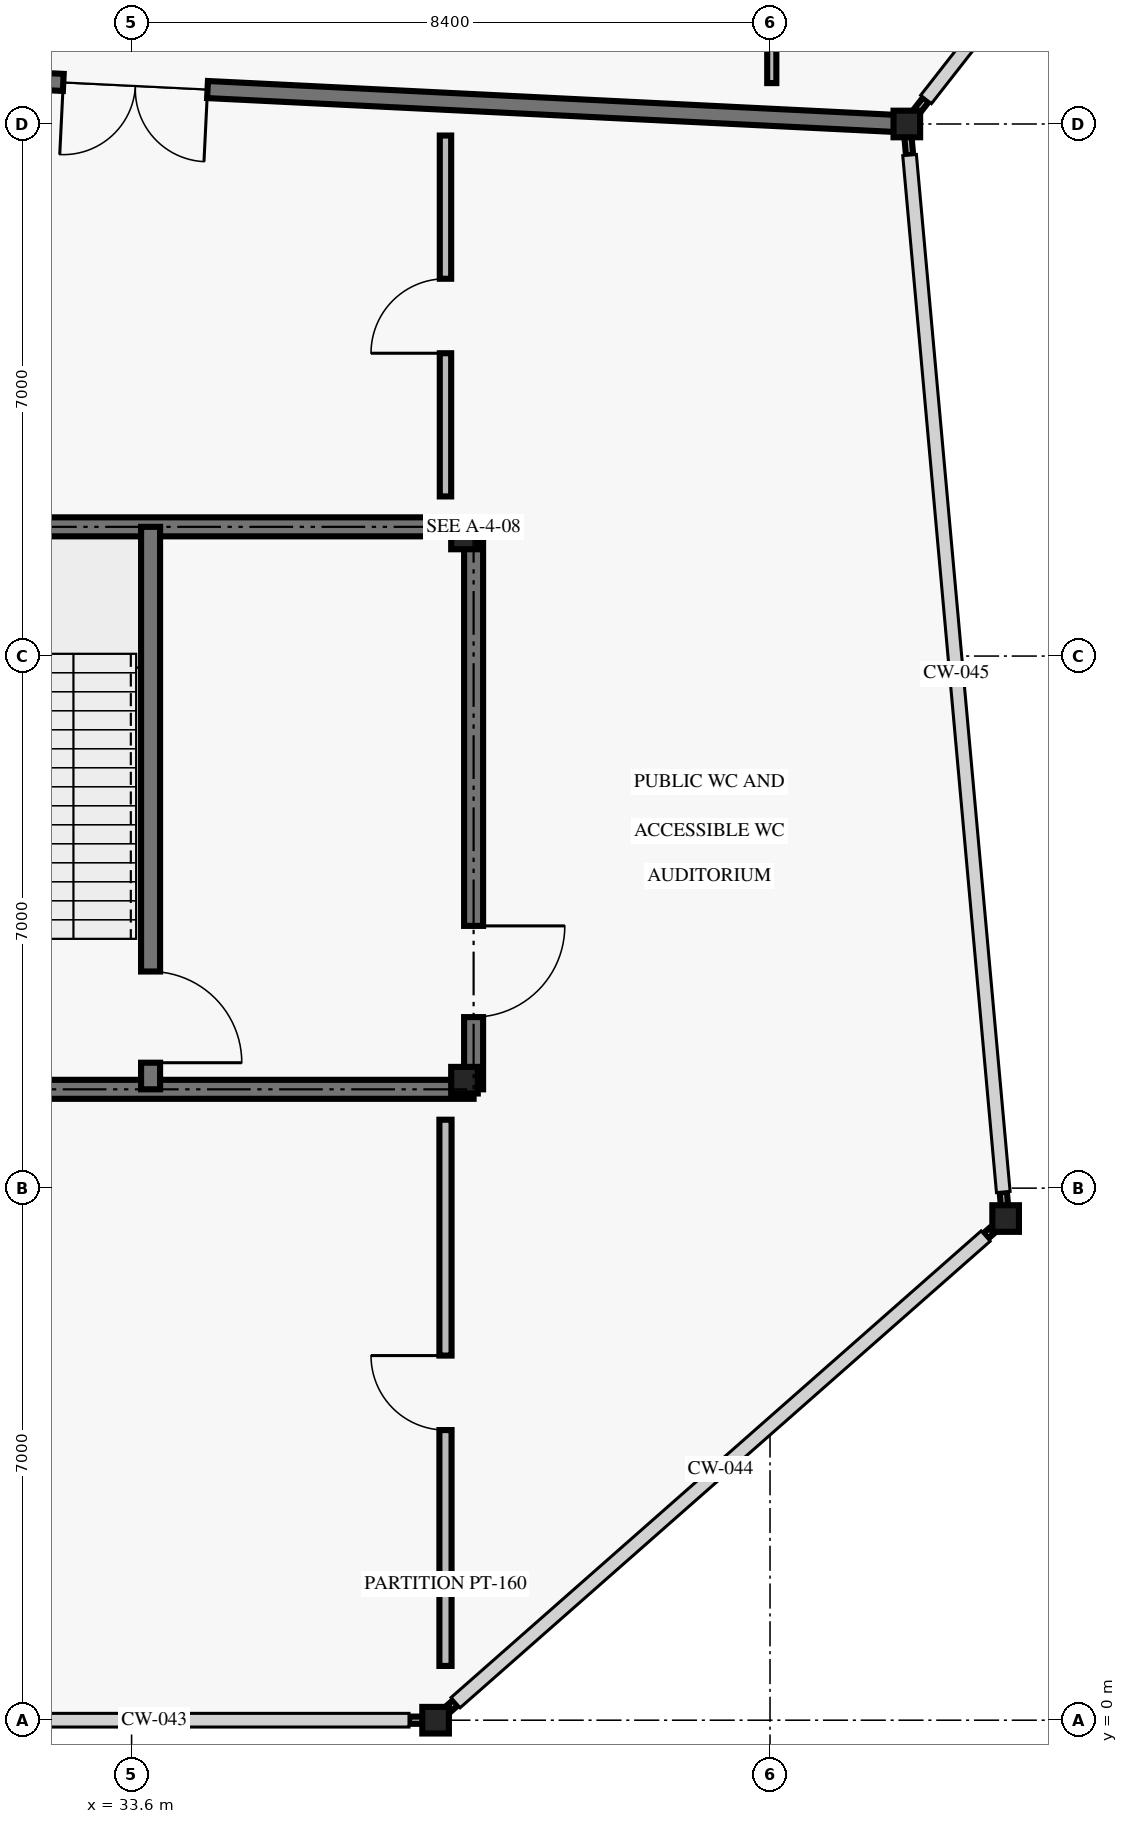
"""IFC4 building model, lengths in metres.
Left out: names, types, materials, properties, quantities, classifications, styles, units other than length and angle.
Written with IfcOpenShell. Run it as: python <this file> out.ifc"""

import sys

from ifc_helpers import new_model, si_unit, direction, frame, frame_2d, origin, origin_2d, place, context, subcontext, project, spatial, rectangle, i_section, extrude, element, fill, save


model = new_model("IFC4")
c1 = context("Model", 3, precision=1e-05, world=origin(), true_north=direction((0.0, 1.0)))
c2 = subcontext(c1, "Body", "Model", "MODEL_VIEW")
j1 = project(units=[si_unit("LENGTHUNIT", "METRE"), si_unit("PLANEANGLEUNIT", "RADIAN")], contexts=[c1])
p1 = place(None, origin())
s1 = spatial("IfcSite", under=j1, at=p1, CompositionType="ELEMENT")
p2 = place(p1, origin())
s2 = spatial("IfcBuilding", under=s1, at=p2, CompositionType="ELEMENT")
p3 = place(p2, origin())
s3 = spatial("IfcBuildingStorey", under=s2, at=p3, CompositionType="ELEMENT", Elevation=0.0)
for number, where, z_axis, x_axis in (
    (1, (37.6, 0.0, 0.0), (0.0, 0.0, 1.0), (1.0, 0.0, 0.0)),
    (2, (43.8, 21.0, 0.0), (0.0, 0.0, 1.0), (1.0, 0.0, 0.0)),
    (3, (45.1, 6.6, 0.0), (0.0, 0.0, 1.0), (1.0, 0.0, 0.0)),
    (4, (37.98, 8.42, 0.0), (0.0, 0.0, 1.0), (1.0, 0.0, 0.0)),
    (5, (37.98, 15.58, 0.0), (0.0, 0.0, 1.0), (1.0, 0.0, 0.0)),
):
    element("IfcColumn", number, at=place(p3, frame(where, z_axis=z_axis, x_axis=x_axis)), inside=s3, PredefinedType="COLUMN", context=c2, shape_type="SweptSolid", body=[
        extrude(i_section(OverallWidth=0.35, OverallDepth=0.35, WebThickness=0.02, FlangeThickness=0.028, at=origin_2d()), origin(), (0.0, 0.0, 1.0), 5.4),
    ])
p4 = place(p3, frame((37.558, 0.0, 0.0), z_axis=(0.0, 0.0, 1.0), x_axis=(-1.0, 0.0, 0.0)))
e6 = element("IfcWall", 6, at=p4, inside=s3, PredefinedType="SOLIDWALL", context=c2, shape_type="SweptSolid", body=[
    extrude(rectangle(XDim=0.308, YDim=0.095, at=frame_2d((0.154, 0.0))), origin(), (0.0, 0.0, 1.0), 4.22),
])
p5 = place(p3, frame((45.068, 6.572, 0.0), z_axis=(0.0, 0.0, 1.0), x_axis=(-0.75124833206, -0.660019653932, 0.0)))
e7 = element("IfcWall", 7, at=p5, inside=s3, PredefinedType="SOLIDWALL", context=c2, shape_type="SweptSolid", body=[
    extrude(rectangle(XDim=0.308, YDim=0.095, at=frame_2d((0.154, 0.0))), origin(), (0.0, 0.0, 1.0), 4.22),
])
p6 = place(p3, frame((37.863, 0.231, 0.0), z_axis=(0.0, 0.0, 1.0), x_axis=(-0.751296149946, -0.659965222627, 0.0)))
e8 = element("IfcWall", 8, at=p6, inside=s3, PredefinedType="SOLIDWALL", context=c2, shape_type="SweptSolid", body=[
    extrude(rectangle(XDim=0.307, YDim=0.095, at=frame_2d((0.154, 0.0))), origin(), (0.0, 0.0, 1.0), 4.22),
])
for number, where, z_axis, x_axis in (
    (9, (43.809, 20.898, 0.0), (0.0, 0.0, 1.0), (0.087, -0.996, 0.0)),
    (10, (45.069, 6.949, 0.0), (0.0, 0.0, 1.0), (0.087, -0.996, 0.0)),
):
    element("IfcWall", number, at=place(p3, frame(where, z_axis=z_axis, x_axis=x_axis)), inside=s3, PredefinedType="SOLIDWALL", context=c2, shape_type="SweptSolid", body=[
        extrude(rectangle(XDim=0.308, YDim=0.095, at=frame_2d((0.154, 0.0))), origin(), (0.0, 0.0, 1.0), 4.22),
    ])
p7 = place(p3, frame((44.053, 21.323, 0.0), z_axis=(0.0, 0.0, 1.0), x_axis=(-0.615966636313, -0.787772240529, 0.0)))
e11 = element("IfcWall", 11, at=p7, inside=s3, PredefinedType="SOLIDWALL", context=c2, shape_type="SweptSolid", body=[
    extrude(rectangle(XDim=0.308, YDim=0.095, at=frame_2d((0.154, 0.0))), origin(), (0.0, 0.0, 1.0), 4.22),
])
p8 = place(p3, frame((43.8, 21.0, 0.0), z_axis=(0.0, 0.0, 1.0), x_axis=(-0.998788882418, 0.049201304434, 0.0)))
e12 = element("IfcWall", 12, at=p8, inside=s3, PredefinedType="SOLIDWALL", context=c2, shape_type="SweptSolid", body=[
    extrude(rectangle(XDim=20.325, YDim=0.225, at=frame_2d((10.162, 0.0))), origin(), (0.0, 0.0, 1.0), 4.62),
])
p9 = place(p8, frame((9.212, 0.0, 0.0)))
e13 = element("IfcOpeningElement", 13, at=p9, cuts=e12, PredefinedType="OPENING", context=c2, shape_type="SweptSolid", body=[
    extrude(rectangle(XDim=1.9, YDim=2.35, at=frame_2d((0.95, 1.175))), frame((0.0, 0.123, 0.0), z_axis=(0.0, -1.0, 0.0), x_axis=(1.0, 0.0, 0.0)), (0.0, 0.0, 1.0), 0.245),
])
p10 = place(p3, frame((37.73, 0.714, 0.0), z_axis=(0.0, 0.0, 1.0), x_axis=(0.0, 1.0, 0.0)))
e14 = element("IfcWall", 14, at=p10, inside=s3, PredefinedType="PARTITIONING", context=c2, shape_type="SweptSolid", body=[
    extrude(rectangle(XDim=7.186, YDim=0.16, at=frame_2d((3.593, 0.0))), origin(), (0.0, 0.0, 1.0), 3.92),
])
p11 = place(p10, frame((3.103, 0.0, 0.0)))
e15 = element("IfcOpeningElement", 15, at=p11, cuts=e14, PredefinedType="OPENING", context=c2, shape_type="SweptSolid", body=[
    extrude(rectangle(XDim=0.98, YDim=2.15, at=frame_2d((0.49, 1.075))), frame((0.0, 0.09, 0.0), z_axis=(0.0, -1.0, 0.0), x_axis=(1.0, 0.0, 0.0)), (0.0, 0.0, 1.0), 0.18),
])
p12 = place(p3, frame((37.73, 16.1, 0.0), z_axis=(0.0, 0.0, 1.0), x_axis=(0.0, 1.0, 0.0)))
e16 = element("IfcWall", 16, at=p12, inside=s3, PredefinedType="PARTITIONING", context=c2, shape_type="SweptSolid", body=[
    extrude(rectangle(XDim=4.748, YDim=0.15, at=frame_2d((2.374, 0.0))), origin(), (0.0, 0.0, 1.0), 3.92),
])
p13 = place(p12, frame((1.884, 0.0, 0.0)))
e17 = element("IfcOpeningElement", 17, at=p13, cuts=e16, PredefinedType="OPENING", context=c2, shape_type="SweptSolid", body=[
    extrude(rectangle(XDim=0.98, YDim=2.15, at=frame_2d((0.49, 1.075))), frame((0.0, 0.085, 0.0), z_axis=(0.0, -1.0, 0.0), x_axis=(1.0, 0.0, 0.0)), (0.0, 0.0, 1.0), 0.17),
])
p14 = place(p3, frame((42.023, 21.538, 0.0), z_axis=(0.0, 0.0, 1.0), x_axis=(0.0, 1.0, 0.0)))
e18 = element("IfcWall", 18, at=p14, inside=s3, PredefinedType="PARTITIONING", context=c2, shape_type="SweptSolid", body=[
    extrude(rectangle(XDim=18.532, YDim=0.12, at=frame_2d((9.266, 0.0))), origin(), (0.0, 0.0, 1.0), 3.92),
])
p15 = place(p14, frame((8.776, 0.0, 0.0)))
e19 = element("IfcOpeningElement", 19, at=p15, cuts=e18, PredefinedType="OPENING", context=c2, shape_type="SweptSolid", body=[
    extrude(rectangle(XDim=0.98, YDim=2.15, at=frame_2d((0.49, 1.075))), frame((0.0, 0.07, 0.0), z_axis=(0.0, -1.0, 0.0), x_axis=(1.0, 0.0, 0.0)), (0.0, 0.0, 1.0), 0.14),
])
for number, where, z_axis, x_axis in (
    (20, (28.9, 15.7, 0.0), (0.0, 0.0, 1.0), (1.0, 0.0, 0.0)),
    (21, (38.1, 8.3, 0.0), (0.0, 0.0, 1.0), (-1.0, 0.0, 0.0)),
):
    element("IfcWall", number, at=place(p3, frame(where, z_axis=z_axis, x_axis=x_axis)), inside=s3, PredefinedType="SHEAR", context=c2, shape_type="SweptSolid", body=[
        extrude(rectangle(XDim=9.2, YDim=0.25, at=frame_2d((4.6, 0.0))), origin(), (0.0, 0.0, 1.0), 5.16),
    ])
p16 = place(p3, frame((38.1, 15.7, 0.0), z_axis=(0.0, 0.0, 1.0), x_axis=(0.0, -1.0, 0.0)))
e22 = element("IfcWall", 22, at=p16, inside=s3, PredefinedType="SHEAR", context=c2, shape_type="SweptSolid", body=[
    extrude(rectangle(XDim=7.4, YDim=0.25, at=frame_2d((3.7, 0.0))), origin(), (0.0, 0.0, 1.0), 5.16),
])
p17 = place(p16, frame((5.25, 0.0, 0.0)))
e23 = element("IfcOpeningElement", 23, at=p17, cuts=e22, PredefinedType="OPENING", context=c2, shape_type="SweptSolid", body=[
    extrude(rectangle(XDim=1.2, YDim=2.2, at=frame_2d((0.6, 1.1))), frame((0.0, 0.135, 0.0), z_axis=(0.0, -1.0, 0.0), x_axis=(1.0, 0.0, 0.0)), (0.0, 0.0, 1.0), 0.27),
])
p18 = place(p3, frame((33.85, 15.7, 0.0), z_axis=(0.0, 0.0, 1.0), x_axis=(0.0, -1.0, 0.0)))
e24 = element("IfcWall", 24, at=p18, inside=s3, PredefinedType="SHEAR", context=c2, shape_type="SweptSolid", body=[
    extrude(rectangle(XDim=7.4, YDim=0.25, at=frame_2d((3.7, 0.0))), origin(), (0.0, 0.0, 1.0), 5.16),
])
p19 = place(p18, frame((5.85, 0.0, 0.0)))
e25 = element("IfcOpeningElement", 25, at=p19, cuts=e24, PredefinedType="OPENING", context=c2, shape_type="SweptSolid", body=[
    extrude(rectangle(XDim=1.2, YDim=2.2, at=frame_2d((0.6, 1.1))), frame((0.0, 0.135, 0.0), z_axis=(0.0, -1.0, 0.0), x_axis=(1.0, 0.0, 0.0)), (0.0, 0.0, 1.0), 0.27),
])
p20 = place(p9, origin())
e26 = element("IfcDoor", 26, at=p20, inside=s3, OperationType="DOUBLE_DOOR_SINGLE_SWING", PredefinedType="DOOR", context=c2, shape_type="SweptSolid", body=[
    extrude(rectangle(XDim=1.9, YDim=2.35, at=frame_2d((0.95, 1.175))), frame((0.0, 0.025, 0.0), z_axis=(0.0, -1.0, 0.0), x_axis=(1.0, 0.0, 0.0)), (0.0, 0.0, 1.0), 0.05),
])
fill(e13, e26)
p21 = place(p11, origin())
e27 = element("IfcDoor", 27, at=p21, inside=s3, OperationType="SINGLE_SWING_RIGHT", PredefinedType="DOOR", context=c2, shape_type="SweptSolid", body=[
    extrude(rectangle(XDim=0.98, YDim=2.15, at=frame_2d((0.49, 1.075))), frame((0.0, 0.025, 0.0), z_axis=(0.0, -1.0, 0.0), x_axis=(1.0, 0.0, 0.0)), (0.0, 0.0, 1.0), 0.05),
])
fill(e15, e27)
p22 = place(p13, origin())
e28 = element("IfcDoor", 28, at=p22, inside=s3, OperationType="SINGLE_SWING_LEFT", PredefinedType="DOOR", context=c2, shape_type="SweptSolid", body=[
    extrude(rectangle(XDim=0.98, YDim=2.15, at=frame_2d((0.49, 1.075))), frame((0.0, 0.025, 0.0), z_axis=(0.0, -1.0, 0.0), x_axis=(1.0, 0.0, 0.0)), (0.0, 0.0, 1.0), 0.05),
])
fill(e17, e28)
p23 = place(p17, origin())
e29 = element("IfcDoor", 29, at=p23, inside=s3, OperationType="SINGLE_SWING_LEFT", PredefinedType="DOOR", context=c2, shape_type="SweptSolid", body=[
    extrude(rectangle(XDim=1.2, YDim=2.2, at=frame_2d((0.6, 1.1))), frame((0.0, 0.025, 0.0), z_axis=(0.0, -1.0, 0.0), x_axis=(1.0, 0.0, 0.0)), (0.0, 0.0, 1.0), 0.05),
])
fill(e23, e29)
p24 = place(p19, origin())
e30 = element("IfcDoor", 30, at=p24, inside=s3, OperationType="SINGLE_SWING_RIGHT", PredefinedType="DOOR", context=c2, shape_type="SweptSolid", body=[
    extrude(rectangle(XDim=1.2, YDim=2.2, at=frame_2d((0.6, 1.1))), frame((0.0, 0.025, 0.0), z_axis=(0.0, -1.0, 0.0), x_axis=(1.0, 0.0, 0.0)), (0.0, 0.0, 1.0), 0.05),
])
fill(e25, e30)
save(model, sys.argv[1])
